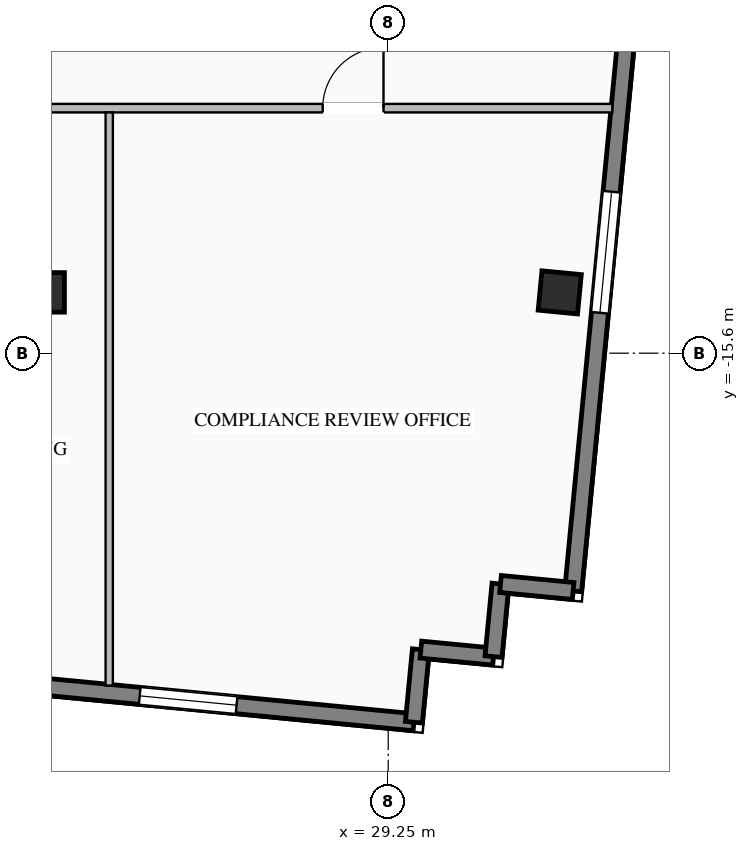
"""IFC4 building model, lengths in metres.
Left out: names, types, materials, properties, quantities, classifications, styles, units other than length and angle.
Written with IfcOpenShell. Run it as: python <this file> out.ifc"""

import sys

from ifc_helpers import new_model, si_unit, direction, frame, frame_2d, origin, origin_2d, place, context, subcontext, project, spatial, rectangle, i_section, extrude, element, fill, save


model = new_model("IFC4")
c1 = context("Model", 3, precision=1e-05, world=origin(), true_north=direction((0.0, 1.0)))
c2 = subcontext(c1, "Body", "Model", "MODEL_VIEW")
j1 = project(units=[si_unit("LENGTHUNIT", "METRE"), si_unit("PLANEANGLEUNIT", "RADIAN")], contexts=[c1])
p1 = place(None, origin())
s1 = spatial("IfcSite", under=j1, at=p1, CompositionType="ELEMENT")
p2 = place(p1, origin())
s2 = spatial("IfcBuilding", under=s1, at=p2, CompositionType="ELEMENT")
p3 = place(p2, frame((0.0, 0.0, 188.0)))
s3 = spatial("IfcBuildingStorey", under=s2, at=p3, CompositionType="ELEMENT", Elevation=188.0)
for number, where, z_axis, x_axis in (
    (1, (23.6, -14.6, 0.0), (0.0, 0.0, 1.0), (1.0, 0.0, 0.0)),
    (2, (32.071, -14.6, 0.0), (0.0, 0.0, 1.0), (0.995, -0.096, 0.0)),
):
    element("IfcColumn", number, at=place(p3, frame(where, z_axis=z_axis, x_axis=x_axis)), inside=s3, PredefinedType="COLUMN", context=c2, shape_type="SweptSolid", body=[
        extrude(i_section(OverallWidth=0.65, OverallDepth=0.65, WebThickness=0.028, FlangeThickness=0.04, at=origin_2d()), origin(), (0.0, 0.0, 1.0), 3.45),
    ])
p4 = place(p3, frame((29.673, -21.67, 0.0), z_axis=(0.0, 0.0, 1.0), x_axis=(-0.995397230529, 0.095835032509, 0.0)))
e3 = element("IfcWall", 3, at=p4, inside=s3, PredefinedType="STANDARD", context=c2, shape_type="SweptSolid", body=[
    extrude(rectangle(XDim=14.34, YDim=0.28, at=frame_2d((7.17, 0.0))), origin(), (0.0, 0.0, 1.0), 3.25),
])
p5 = place(p4, frame((2.93, 0.0, 0.76)))
e4 = element("IfcOpeningElement", 4, at=p5, cuts=e3, PredefinedType="OPENING", context=c2, shape_type="SweptSolid", body=[
    extrude(rectangle(XDim=1.6, YDim=1.95, at=frame_2d((0.8, 0.975))), frame((0.0, 0.15, 0.0), z_axis=(0.0, -1.0, 0.0), x_axis=(1.0, 0.0, 0.0)), (0.0, 0.0, 1.0), 0.3),
])
p6 = place(p4, frame((8.76, 0.0, 0.76)))
e5 = element("IfcOpeningElement", 5, at=p6, cuts=e3, PredefinedType="OPENING", context=c2, shape_type="SweptSolid", body=[
    extrude(rectangle(XDim=1.6, YDim=1.95, at=frame_2d((0.8, 0.975))), frame((0.0, 0.15, 0.0), z_axis=(0.0, -1.0, 0.0), x_axis=(1.0, 0.0, 0.0)), (0.0, 0.0, 1.0), 0.3),
])
p7 = place(p3, frame((33.901, -2.798, 0.0), z_axis=(0.0, 0.0, 1.0), x_axis=(-0.095853434568, -0.99539545864, 0.0)))
e6 = element("IfcWall", 6, at=p7, inside=s3, PredefinedType="STANDARD", context=c2, shape_type="SweptSolid", body=[
    extrude(rectangle(XDim=16.79, YDim=0.28, at=frame_2d((8.395, 0.0))), origin(), (0.0, 0.0, 1.0), 3.25),
])
p8 = place(p7, frame((3.547, 0.0, 0.76)))
e7 = element("IfcOpeningElement", 7, at=p8, cuts=e6, PredefinedType="OPENING", context=c2, shape_type="SweptSolid", body=[
    extrude(rectangle(XDim=2.0, YDim=2.05, at=frame_2d((1.0, 1.025))), frame((0.0, 0.15, 0.0), z_axis=(0.0, -1.0, 0.0), x_axis=(1.0, 0.0, 0.0)), (0.0, 0.0, 1.0), 0.3),
])
p9 = place(p7, frame((10.193, 0.0, 0.76)))
e8 = element("IfcOpeningElement", 8, at=p9, cuts=e6, PredefinedType="OPENING", context=c2, shape_type="SweptSolid", body=[
    extrude(rectangle(XDim=2.0, YDim=2.05, at=frame_2d((1.0, 1.025))), frame((0.0, 0.15, 0.0), z_axis=(0.0, -1.0, 0.0), x_axis=(1.0, 0.0, 0.0)), (0.0, 0.0, 1.0), 0.3),
])
for number, where, z_axis, x_axis in (
    (9, (29.673, -21.67, 0.0), (0.0, 0.0, 1.0), (0.096, 0.995, 0.0)),
    (10, (29.788, -20.476, 0.0), (0.0, 0.0, 1.0), (0.995, -0.096, 0.0)),
):
    element("IfcWall", number, at=place(p3, frame(where, z_axis=z_axis, x_axis=x_axis)), inside=s3, PredefinedType="STANDARD", context=c2, shape_type="SweptSolid", body=[
        extrude(rectangle(XDim=1.2, YDim=0.28, at=frame_2d((0.6, 0.0))), origin(), (0.0, 0.0, 1.0), 3.25),
    ])
p10 = place(p3, frame((30.982, -20.591, 0.0), z_axis=(0.0, 0.0, 1.0), x_axis=(0.096018626938, 0.995379537303, 0.0)))
e11 = element("IfcWall", 11, at=p10, inside=s3, PredefinedType="STANDARD", context=c2, shape_type="SweptSolid", body=[
    extrude(rectangle(XDim=1.2, YDim=0.28, at=frame_2d((0.6, 0.0))), origin(), (0.0, 0.0, 1.0), 3.25),
])
p11 = place(p3, frame((31.097, -19.396, 0.0), z_axis=(0.0, 0.0, 1.0), x_axis=(0.995397091755, -0.095836473879, 0.0)))
e12 = element("IfcWall", 12, at=p11, inside=s3, PredefinedType="STANDARD", context=c2, shape_type="SweptSolid", body=[
    extrude(rectangle(XDim=1.2, YDim=0.28, at=frame_2d((0.6, 0.0))), origin(), (0.0, 0.0, 1.0), 3.25),
])
p12 = place(p3, frame((-27.583, -11.57, 0.0), z_axis=(0.0, 0.0, 1.0), x_axis=(1.0, 0.0, 0.0)))
e13 = element("IfcWall", 13, at=p12, inside=s3, PredefinedType="STANDARD", context=c2, shape_type="SweptSolid", body=[
    extrude(rectangle(XDim=60.519, YDim=0.14, at=frame_2d((30.259, 0.0))), origin(), (0.0, 0.0, 1.0), 3.25),
])
p13 = place(p12, frame((27.673, 0.0, 0.0)))
e14 = element("IfcOpeningElement", 14, at=p13, cuts=e13, PredefinedType="OPENING", context=c2, shape_type="SweptSolid", body=[
    extrude(rectangle(XDim=0.92, YDim=2.08, at=frame_2d((0.46, 1.04))), frame((0.0, 0.08, 0.0), z_axis=(0.0, -1.0, 0.0), x_axis=(1.0, 0.0, 0.0)), (0.0, 0.0, 1.0), 0.16),
])
p14 = place(p12, frame((31.173, 0.0, 0.0)))
e15 = element("IfcOpeningElement", 15, at=p14, cuts=e13, PredefinedType="OPENING", context=c2, shape_type="SweptSolid", body=[
    extrude(rectangle(XDim=0.92, YDim=2.08, at=frame_2d((0.46, 1.04))), frame((0.0, 0.08, 0.0), z_axis=(0.0, -1.0, 0.0), x_axis=(1.0, 0.0, 0.0)), (0.0, 0.0, 1.0), 0.16),
])
p15 = place(p12, frame((34.023, 0.0, 0.0)))
e16 = element("IfcOpeningElement", 16, at=p15, cuts=e13, PredefinedType="OPENING", context=c2, shape_type="SweptSolid", body=[
    extrude(rectangle(XDim=0.92, YDim=2.08, at=frame_2d((0.46, 1.04))), frame((0.0, 0.08, 0.0), z_axis=(0.0, -1.0, 0.0), x_axis=(1.0, 0.0, 0.0)), (0.0, 0.0, 1.0), 0.16),
])
p16 = place(p12, frame((3.936, 0.0, 0.0)))
e17 = element("IfcOpeningElement", 17, at=p16, cuts=e13, PredefinedType="OPENING", context=c2, shape_type="SweptSolid", body=[
    extrude(rectangle(XDim=1.0, YDim=2.08, at=frame_2d((0.5, 1.04))), frame((0.0, 0.08, 0.0), z_axis=(0.0, -1.0, 0.0), x_axis=(1.0, 0.0, 0.0)), (0.0, 0.0, 1.0), 0.16),
])
p17 = place(p12, frame((12.626, 0.0, 0.0)))
e18 = element("IfcOpeningElement", 18, at=p17, cuts=e13, PredefinedType="OPENING", context=c2, shape_type="SweptSolid", body=[
    extrude(rectangle(XDim=1.0, YDim=2.08, at=frame_2d((0.5, 1.04))), frame((0.0, 0.08, 0.0), z_axis=(0.0, -1.0, 0.0), x_axis=(1.0, 0.0, 0.0)), (0.0, 0.0, 1.0), 0.16),
])
p18 = place(p12, frame((21.509, 0.0, 0.0)))
e19 = element("IfcOpeningElement", 19, at=p18, cuts=e13, PredefinedType="OPENING", context=c2, shape_type="SweptSolid", body=[
    extrude(rectangle(XDim=1.0, YDim=2.08, at=frame_2d((0.5, 1.04))), frame((0.0, 0.08, 0.0), z_axis=(0.0, -1.0, 0.0), x_axis=(1.0, 0.0, 0.0)), (0.0, 0.0, 1.0), 0.16),
])
p19 = place(p12, frame((39.187, 0.0, 0.0)))
e20 = element("IfcOpeningElement", 20, at=p19, cuts=e13, PredefinedType="OPENING", context=c2, shape_type="SweptSolid", body=[
    extrude(rectangle(XDim=1.0, YDim=2.08, at=frame_2d((0.5, 1.04))), frame((0.0, 0.08, 0.0), z_axis=(0.0, -1.0, 0.0), x_axis=(1.0, 0.0, 0.0)), (0.0, 0.0, 1.0), 0.16),
])
p20 = place(p12, frame((47.518, 0.0, 0.0)))
e21 = element("IfcOpeningElement", 21, at=p20, cuts=e13, PredefinedType="OPENING", context=c2, shape_type="SweptSolid", body=[
    extrude(rectangle(XDim=1.0, YDim=2.08, at=frame_2d((0.5, 1.04))), frame((0.0, 0.08, 0.0), z_axis=(0.0, -1.0, 0.0), x_axis=(1.0, 0.0, 0.0)), (0.0, 0.0, 1.0), 0.16),
])
p21 = place(p12, frame((55.756, 0.0, 0.0)))
e22 = element("IfcOpeningElement", 22, at=p21, cuts=e13, PredefinedType="OPENING", context=c2, shape_type="SweptSolid", body=[
    extrude(rectangle(XDim=1.0, YDim=2.08, at=frame_2d((0.5, 1.04))), frame((0.0, 0.08, 0.0), z_axis=(0.0, -1.0, 0.0), x_axis=(1.0, 0.0, 0.0)), (0.0, 0.0, 1.0), 0.16),
])
p22 = place(p3, frame((24.662, -21.067, 0.0), z_axis=(0.0, 0.0, 1.0), x_axis=(0.0, 1.0, 0.0)))
e23 = element("IfcWall", 23, at=p22, inside=s3, PredefinedType="STANDARD", context=c2, shape_type="SweptSolid", body=[
    extrude(rectangle(XDim=9.427, YDim=0.12, at=frame_2d((4.713, 0.0))), origin(), (0.0, 0.0, 1.0), 3.25),
])
p23 = place(p5, origin())
e24 = element("IfcWindow", 24, at=p23, inside=s3, PartitioningType="SINGLE_PANEL", PredefinedType="WINDOW", context=c2, shape_type="SweptSolid", body=[
    extrude(rectangle(XDim=1.6, YDim=1.95, at=frame_2d((0.8, 0.975))), frame((0.0, 0.03, 0.0), z_axis=(0.0, -1.0, 0.0), x_axis=(1.0, 0.0, 0.0)), (0.0, 0.0, 1.0), 0.06),
])
fill(e4, e24)
p24 = place(p9, origin())
e25 = element("IfcWindow", 25, at=p24, inside=s3, PartitioningType="DOUBLE_PANEL_VERTICAL", PredefinedType="WINDOW", context=c2, shape_type="SweptSolid", body=[
    extrude(rectangle(XDim=2.0, YDim=2.05, at=frame_2d((1.0, 1.025))), frame((0.0, 0.03, 0.0), z_axis=(0.0, -1.0, 0.0), x_axis=(1.0, 0.0, 0.0)), (0.0, 0.0, 1.0), 0.06),
])
fill(e8, e25)
p25 = place(p21, origin())
e26 = element("IfcDoor", 26, at=p25, inside=s3, OperationType="SINGLE_SWING_RIGHT", PredefinedType="DOOR", context=c2, shape_type="SweptSolid", body=[
    extrude(rectangle(XDim=1.0, YDim=2.08, at=frame_2d((0.5, 1.04))), frame((0.0, 0.025, 0.0), z_axis=(0.0, -1.0, 0.0), x_axis=(1.0, 0.0, 0.0)), (0.0, 0.0, 1.0), 0.05),
])
fill(e22, e26)
save(model, sys.argv[1])
